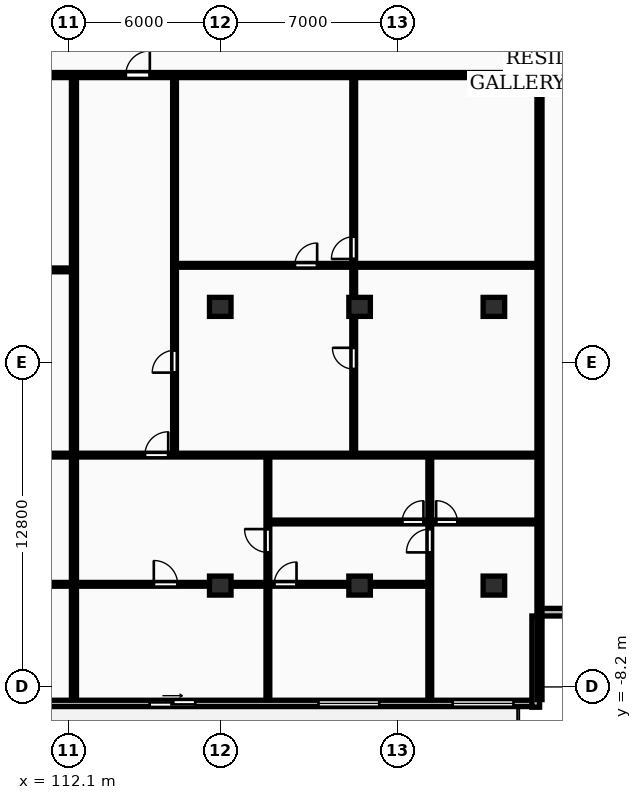
"""IFC4 building model, lengths in metres.
Left out: names, types, materials, properties, quantities, classifications, styles, units other than length and angle.
Written with IfcOpenShell. Run it as: python <this file> out.ifc"""

import sys

from ifc_helpers import new_model, si_unit, direction, frame, frame_2d, origin, origin_2d, place, context, subcontext, project, spatial, rectangle, extrude, element, fill, save


model = new_model("IFC4")
c1 = context("Model", 3, precision=1e-05, world=origin(), true_north=direction((0.0, 1.0)))
c2 = subcontext(c1, "Body", "Model", "MODEL_VIEW")
j1 = project(units=[si_unit("LENGTHUNIT", "METRE"), si_unit("PLANEANGLEUNIT", "RADIAN")], contexts=[c1])
p1 = place(None, origin())
s1 = spatial("IfcSite", under=j1, at=p1, CompositionType="ELEMENT")
p2 = place(p1, origin())
s2 = spatial("IfcBuilding", under=s1, at=p2, CompositionType="ELEMENT")
p3 = place(p2, frame((0.0, 0.0, 100.3)))
s3 = spatial("IfcBuildingStorey", under=s2, at=p3, CompositionType="ELEMENT", Elevation=100.3)
for number, where, z_axis, x_axis in (
    (1, (118.1, -4.2, 0.0), (0.0, 0.0, 1.0), (1.0, 0.0, 0.0)),
    (2, (118.1, 6.8, 0.0), (0.0, 0.0, 1.0), (1.0, 0.0, 0.0)),
    (3, (123.6, -4.2, 0.0), (0.0, 0.0, 1.0), (1.0, 0.0, 0.0)),
    (4, (123.6, 6.8, 0.0), (0.0, 0.0, 1.0), (1.0, 0.0, 0.0)),
    (5, (128.9, -4.2, 0.0), (0.0, 0.0, 1.0), (1.0, 0.0, 0.0)),
    (6, (128.9, 6.8, 0.0), (0.0, 0.0, 1.0), (1.0, 0.0, 0.0)),
):
    element("IfcColumn", number, at=place(p3, frame(where, z_axis=z_axis, x_axis=x_axis)), inside=s3, PredefinedType="COLUMN", context=c2, shape_type="SweptSolid", body=[
        extrude(rectangle(XDim=0.85, YDim=0.75, at=origin_2d()), origin(), (0.0, 0.0, 1.0), 3.25),
    ])
p4 = place(p3, frame((72.7, -8.85, 0.0), z_axis=(0.0, 0.0, 1.0), x_axis=(1.0, 0.0, 0.0)))
e7 = element("IfcWall", 7, at=p4, inside=s3, PredefinedType="STANDARD", context=c2, shape_type="SweptSolid", body=[
    extrude(rectangle(XDim=58.0, YDim=0.25, at=frame_2d((29.0, 0.0))), origin(), (0.0, 0.0, 1.0), 2.97),
])
p5 = place(p4, frame((3.137, 0.0, 0.0)))
e8 = element("IfcOpeningElement", 8, at=p5, cuts=e7, PredefinedType="OPENING", context=c2, shape_type="SweptSolid", body=[
    extrude(rectangle(XDim=1.8, YDim=2.2, at=frame_2d((0.9, 1.1))), frame((0.0, 0.135, 0.0), z_axis=(0.0, -1.0, 0.0), x_axis=(1.0, 0.0, 0.0)), (0.0, 0.0, 1.0), 0.27),
])
p6 = place(p4, frame((12.093, 0.0, 0.85)))
e9 = element("IfcOpeningElement", 9, at=p6, cuts=e7, PredefinedType="OPENING", context=c2, shape_type="SweptSolid", body=[
    extrude(rectangle(XDim=2.4, YDim=1.9, at=frame_2d((1.2, 0.95))), frame((0.0, 0.135, 0.0), z_axis=(0.0, -1.0, 0.0), x_axis=(1.0, 0.0, 0.0)), (0.0, 0.0, 1.0), 0.27),
])
p7 = place(p4, frame((22.913, 0.0, 0.0)))
e10 = element("IfcOpeningElement", 10, at=p7, cuts=e7, PredefinedType="OPENING", context=c2, shape_type="SweptSolid", body=[
    extrude(rectangle(XDim=1.8, YDim=2.2, at=frame_2d((0.9, 1.1))), frame((0.0, 0.135, 0.0), z_axis=(0.0, -1.0, 0.0), x_axis=(1.0, 0.0, 0.0)), (0.0, 0.0, 1.0), 0.27),
])
p8 = place(p4, frame((33.35, 0.0, 0.0)))
e11 = element("IfcOpeningElement", 11, at=p8, cuts=e7, PredefinedType="OPENING", context=c2, shape_type="SweptSolid", body=[
    extrude(rectangle(XDim=1.8, YDim=2.2, at=frame_2d((0.9, 1.1))), frame((0.0, 0.135, 0.0), z_axis=(0.0, -1.0, 0.0), x_axis=(1.0, 0.0, 0.0)), (0.0, 0.0, 1.0), 0.27),
])
p9 = place(p4, frame((49.275, 0.0, 0.85)))
e12 = element("IfcOpeningElement", 12, at=p9, cuts=e7, PredefinedType="OPENING", context=c2, shape_type="SweptSolid", body=[
    extrude(rectangle(XDim=2.4, YDim=1.9, at=frame_2d((1.2, 0.95))), frame((0.0, 0.135, 0.0), z_axis=(0.0, -1.0, 0.0), x_axis=(1.0, 0.0, 0.0)), (0.0, 0.0, 1.0), 0.27),
])
p10 = place(p4, frame((42.613, 0.0, 0.0)))
e13 = element("IfcOpeningElement", 13, at=p10, cuts=e7, PredefinedType="OPENING", context=c2, shape_type="SweptSolid", body=[
    extrude(rectangle(XDim=1.8, YDim=2.2, at=frame_2d((0.9, 1.1))), frame((0.0, 0.135, 0.0), z_axis=(0.0, -1.0, 0.0), x_axis=(1.0, 0.0, 0.0)), (0.0, 0.0, 1.0), 0.27),
])
p11 = place(p4, frame((54.575, 0.0, 0.85)))
e14 = element("IfcOpeningElement", 14, at=p11, cuts=e7, PredefinedType="OPENING", context=c2, shape_type="SweptSolid", body=[
    extrude(rectangle(XDim=2.4, YDim=1.9, at=frame_2d((1.2, 0.95))), frame((0.0, 0.135, 0.0), z_axis=(0.0, -1.0, 0.0), x_axis=(1.0, 0.0, 0.0)), (0.0, 0.0, 1.0), 0.27),
])
for number, where, z_axis, x_axis in (
    (15, (130.55, -9.0, 0.0), (0.0, 0.0, 1.0), (0.0, 1.0, 0.0)),
    (16, (130.7, -5.25, 0.0), (0.0, 0.0, 1.0), (1.0, 0.0, 0.0)),
):
    element("IfcWall", number, at=place(p3, frame(where, z_axis=z_axis, x_axis=x_axis)), inside=s3, PredefinedType="STANDARD", context=c2, shape_type="SweptSolid", body=[
        extrude(rectangle(XDim=3.6, YDim=0.3, at=frame_2d((1.8, 0.0))), origin(), (0.0, 0.0, 1.0), 2.97),
    ])
for number, where, z_axis, x_axis in (
    (17, (130.7, -8.7, 0.0), (0.0, 0.0, 1.0), (0.0, 1.0, 0.0)),
    (18, (112.325, -8.7, 0.0), (0.0, 0.0, 1.0), (0.0, 1.0, 0.0)),
):
    element("IfcWall", number, at=place(p3, frame(where, z_axis=z_axis, x_axis=x_axis)), inside=s3, PredefinedType="PARTITIONING", context=c2, shape_type="SweptSolid", body=[
        extrude(rectangle(XDim=24.57, YDim=0.2, at=frame_2d((12.285, 0.0))), origin(), (0.0, 0.0, 1.0), 2.97),
    ])
p12 = place(p3, frame((105.605, 8.26, 0.0), z_axis=(0.0, 0.0, 1.0), x_axis=(1.0, 0.0, 0.0)))
e19 = element("IfcWall", 19, at=p12, inside=s3, PredefinedType="PARTITIONING", context=c2, shape_type="SweptSolid", body=[
    extrude(rectangle(XDim=6.64, YDim=0.15, at=frame_2d((3.32, 0.0))), origin(), (0.0, 0.0, 1.0), 2.97),
])
p13 = place(p12, frame((0.957, 0.0, 0.0)))
e20 = element("IfcOpeningElement", 20, at=p13, cuts=e19, PredefinedType="OPENING", context=c2, shape_type="SweptSolid", body=[
    extrude(rectangle(XDim=0.88, YDim=2.06, at=frame_2d((0.44, 1.03))), frame((0.0, 0.085, 0.0), z_axis=(0.0, -1.0, 0.0), x_axis=(1.0, 0.0, 0.0)), (0.0, 0.0, 1.0), 0.17),
])
p14 = place(p3, frame((101.655, 0.95, 0.0), z_axis=(0.0, 0.0, 1.0), x_axis=(1.0, 0.0, 0.0)))
e21 = element("IfcWall", 21, at=p14, inside=s3, PredefinedType="PARTITIONING", context=c2, shape_type="SweptSolid", body=[
    extrude(rectangle(XDim=10.59, YDim=0.15, at=frame_2d((5.295, 0.0))), origin(), (0.0, 0.0, 1.0), 2.97),
])
p15 = place(p14, frame((4.835, 0.0, 0.0)))
e22 = element("IfcOpeningElement", 22, at=p15, cuts=e21, PredefinedType="OPENING", context=c2, shape_type="SweptSolid", body=[
    extrude(rectangle(XDim=0.92, YDim=2.08, at=frame_2d((0.46, 1.04))), frame((0.0, 0.085, 0.0), z_axis=(0.0, -1.0, 0.0), x_axis=(1.0, 0.0, 0.0)), (0.0, 0.0, 1.0), 0.17),
])
p16 = place(p3, frame((101.655, -4.15, 0.0), z_axis=(0.0, 0.0, 1.0), x_axis=(1.0, 0.0, 0.0)))
e23 = element("IfcWall", 23, at=p16, inside=s3, PredefinedType="PARTITIONING", context=c2, shape_type="SweptSolid", body=[
    extrude(rectangle(XDim=10.59, YDim=0.15, at=frame_2d((5.295, 0.0))), origin(), (0.0, 0.0, 1.0), 2.663),
])
p17 = place(p16, frame((4.835, 0.0, 0.0)))
e24 = element("IfcOpeningElement", 24, at=p17, cuts=e23, PredefinedType="OPENING", context=c2, shape_type="SweptSolid", body=[
    extrude(rectangle(XDim=0.92, YDim=2.08, at=frame_2d((0.46, 1.04))), frame((0.0, 0.085, 0.0), z_axis=(0.0, -1.0, 0.0), x_axis=(1.0, 0.0, 0.0)), (0.0, 0.0, 1.0), 0.17),
])
p18 = place(p3, frame((123.367, 0.99, 0.0), z_axis=(0.0, 0.0, 1.0), x_axis=(0.0, 1.0, 0.0)))
e25 = element("IfcWall", 25, at=p18, inside=s3, PredefinedType="PARTITIONING", context=c2, shape_type="SweptSolid", body=[
    extrude(rectangle(XDim=14.9, YDim=0.15, at=frame_2d((7.45, 0.0))), origin(), (0.0, 0.0, 1.0), 2.2),
])
p19 = place(p18, frame((3.355, 0.0, 0.0)))
e26 = element("IfcOpeningElement", 26, at=p19, cuts=e25, PredefinedType="OPENING", context=c2, shape_type="SweptSolid", body=[
    extrude(rectangle(XDim=0.84, YDim=2.04, at=frame_2d((0.42, 1.02))), frame((0.0, 0.085, 0.0), z_axis=(0.0, -1.0, 0.0), x_axis=(1.0, 0.0, 0.0)), (0.0, 0.0, 1.0), 0.17),
])
p20 = place(p18, frame((7.7, 0.0, 0.0)))
e27 = element("IfcOpeningElement", 27, at=p20, cuts=e25, PredefinedType="OPENING", context=c2, shape_type="SweptSolid", body=[
    extrude(rectangle(XDim=0.88, YDim=2.06, at=frame_2d((0.44, 1.03))), frame((0.0, 0.085, 0.0), z_axis=(0.0, -1.0, 0.0), x_axis=(1.0, 0.0, 0.0)), (0.0, 0.0, 1.0), 0.17),
])
p21 = place(p3, frame((116.355, 8.44, 0.0), z_axis=(0.0, 0.0, 1.0), x_axis=(1.0, 0.0, 0.0)))
e28 = element("IfcWall", 28, at=p21, inside=s3, PredefinedType="PARTITIONING", context=c2, shape_type="SweptSolid", body=[
    extrude(rectangle(XDim=14.265, YDim=0.15, at=frame_2d((7.133, 0.0))), origin(), (0.0, 0.0, 1.0), 2.97),
])
p22 = place(p21, frame((4.689, 0.0, 0.0)))
e29 = element("IfcOpeningElement", 29, at=p22, cuts=e28, PredefinedType="OPENING", context=c2, shape_type="SweptSolid", body=[
    extrude(rectangle(XDim=0.88, YDim=2.06, at=frame_2d((0.44, 1.03))), frame((0.0, 0.085, 0.0), z_axis=(0.0, -1.0, 0.0), x_axis=(1.0, 0.0, 0.0)), (0.0, 0.0, 1.0), 0.17),
])
p23 = place(p3, frame((116.295, 0.99, 0.0), z_axis=(0.0, 0.0, 1.0), x_axis=(0.0, 1.0, 0.0)))
e30 = element("IfcWall", 30, at=p23, inside=s3, PredefinedType="PARTITIONING", context=c2, shape_type="SweptSolid", body=[
    extrude(rectangle(XDim=14.9, YDim=0.15, at=frame_2d((7.45, 0.0))), origin(), (0.0, 0.0, 1.0), 2.97),
])
p24 = place(p23, frame((3.216, 0.0, 0.0)))
e31 = element("IfcOpeningElement", 31, at=p24, cuts=e30, PredefinedType="OPENING", context=c2, shape_type="SweptSolid", body=[
    extrude(rectangle(XDim=0.88, YDim=2.06, at=frame_2d((0.44, 1.03))), frame((0.0, 0.085, 0.0), z_axis=(0.0, -1.0, 0.0), x_axis=(1.0, 0.0, 0.0)), (0.0, 0.0, 1.0), 0.17),
])
p25 = place(p3, frame((119.98, -8.7, 0.0), z_axis=(0.0, 0.0, 1.0), x_axis=(0.0, 1.0, 0.0)))
e32 = element("IfcWall", 32, at=p25, inside=s3, PredefinedType="PARTITIONING", context=c2, shape_type="SweptSolid", body=[
    extrude(rectangle(XDim=9.61, YDim=0.15, at=frame_2d((4.805, 0.0))), origin(), (0.0, 0.0, 1.0), 2.97),
])
p26 = place(p25, frame((5.81, 0.0, 0.0)))
e33 = element("IfcOpeningElement", 33, at=p26, cuts=e32, PredefinedType="OPENING", context=c2, shape_type="SweptSolid", body=[
    extrude(rectangle(XDim=0.92, YDim=2.08, at=frame_2d((0.46, 1.04))), frame((0.0, 0.085, 0.0), z_axis=(0.0, -1.0, 0.0), x_axis=(1.0, 0.0, 0.0)), (0.0, 0.0, 1.0), 0.17),
])
p27 = place(p3, frame((126.37, -1.67, 0.0), z_axis=(0.0, 0.0, 1.0), x_axis=(0.0, 1.0, 0.0)))
e34 = element("IfcWall", 34, at=p27, inside=s3, PredefinedType="PARTITIONING", context=c2, shape_type="SweptSolid", body=[
    extrude(rectangle(XDim=2.58, YDim=0.15, at=frame_2d((1.29, 0.0))), origin(), (0.0, 0.0, 1.0), 2.97),
])
p28 = place(p3, frame((126.37, -8.7, 0.0), z_axis=(0.0, 0.0, 1.0), x_axis=(0.0, 1.0, 0.0)))
e35 = element("IfcWall", 35, at=p28, inside=s3, PredefinedType="PARTITIONING", context=c2, shape_type="SweptSolid", body=[
    extrude(rectangle(XDim=6.99, YDim=0.15, at=frame_2d((3.495, 0.0))), origin(), (0.0, 0.0, 1.0), 2.97),
])
p29 = place(p28, frame((5.81, 0.0, 0.0)))
e36 = element("IfcOpeningElement", 36, at=p29, cuts=e35, PredefinedType="OPENING", context=c2, shape_type="SweptSolid", body=[
    extrude(rectangle(XDim=0.92, YDim=2.08, at=frame_2d((0.46, 1.04))), frame((0.0, 0.085, 0.0), z_axis=(0.0, -1.0, 0.0), x_axis=(1.0, 0.0, 0.0)), (0.0, 0.0, 1.0), 0.17),
])
p30 = place(p3, frame((120.02, -1.69, 0.0), z_axis=(0.0, 0.0, 1.0), x_axis=(1.0, 0.0, 0.0)))
e37 = element("IfcWall", 37, at=p30, inside=s3, PredefinedType="PARTITIONING", context=c2, shape_type="SweptSolid", body=[
    extrude(rectangle(XDim=10.6, YDim=0.15, at=frame_2d((5.3, 0.0))), origin(), (0.0, 0.0, 1.0), 2.97),
])
p31 = place(p30, frame((5.26, 0.0, 0.0)))
e38 = element("IfcOpeningElement", 38, at=p31, cuts=e37, PredefinedType="OPENING", context=c2, shape_type="SweptSolid", body=[
    extrude(rectangle(XDim=0.84, YDim=2.04, at=frame_2d((0.42, 1.02))), frame((0.0, 0.085, 0.0), z_axis=(0.0, -1.0, 0.0), x_axis=(1.0, 0.0, 0.0)), (0.0, 0.0, 1.0), 0.17),
])
p32 = place(p30, frame((6.6, 0.0, 0.0)))
e39 = element("IfcOpeningElement", 39, at=p32, cuts=e37, PredefinedType="OPENING", context=c2, shape_type="SweptSolid", body=[
    extrude(rectangle(XDim=0.84, YDim=2.04, at=frame_2d((0.42, 1.02))), frame((0.0, 0.085, 0.0), z_axis=(0.0, -1.0, 0.0), x_axis=(1.0, 0.0, 0.0)), (0.0, 0.0, 1.0), 0.17),
])
p33 = place(p3, frame((112.405, 0.95, 0.0), z_axis=(0.0, 0.0, 1.0), x_axis=(1.0, 0.0, 0.0)))
e40 = element("IfcWall", 40, at=p33, inside=s3, PredefinedType="PARTITIONING", context=c2, shape_type="SweptSolid", body=[
    extrude(rectangle(XDim=18.215, YDim=0.15, at=frame_2d((9.107, 0.0))), origin(), (0.0, 0.0, 1.0), 2.97),
])
p34 = place(p33, frame((2.72, 0.0, 0.0)))
e41 = element("IfcOpeningElement", 41, at=p34, cuts=e40, PredefinedType="OPENING", context=c2, shape_type="SweptSolid", body=[
    extrude(rectangle(XDim=0.92, YDim=2.08, at=frame_2d((0.46, 1.04))), frame((0.0, 0.085, 0.0), z_axis=(0.0, -1.0, 0.0), x_axis=(1.0, 0.0, 0.0)), (0.0, 0.0, 1.0), 0.17),
])
p35 = place(p3, frame((112.405, -4.15, 0.0), z_axis=(0.0, 0.0, 1.0), x_axis=(1.0, 0.0, 0.0)))
e42 = element("IfcWall", 42, at=p35, inside=s3, PredefinedType="PARTITIONING", context=c2, shape_type="SweptSolid", body=[
    extrude(rectangle(XDim=13.965, YDim=0.15, at=frame_2d((6.982, 0.0))), origin(), (0.0, 0.0, 1.0), 2.663),
])
p36 = place(p35, frame((3.072, 0.0, 0.0)))
e43 = element("IfcOpeningElement", 43, at=p36, cuts=e42, PredefinedType="OPENING", context=c2, shape_type="SweptSolid", body=[
    extrude(rectangle(XDim=0.94, YDim=2.1, at=frame_2d((0.47, 1.05))), frame((0.0, 0.085, 0.0), z_axis=(0.0, -1.0, 0.0), x_axis=(1.0, 0.0, 0.0)), (0.0, 0.0, 1.0), 0.17),
])
p37 = place(p35, frame((7.825, 0.0, 0.0)))
e44 = element("IfcOpeningElement", 44, at=p37, cuts=e42, PredefinedType="OPENING", context=c2, shape_type="SweptSolid", body=[
    extrude(rectangle(XDim=0.88, YDim=2.06, at=frame_2d((0.44, 1.03))), frame((0.0, 0.085, 0.0), z_axis=(0.0, -1.0, 0.0), x_axis=(1.0, 0.0, 0.0)), (0.0, 0.0, 1.0), 0.17),
])
p38 = place(p3, frame((72.7, 15.95, 0.0), z_axis=(0.0, 0.0, 1.0), x_axis=(1.0, 0.0, 0.0)))
e45 = element("IfcWall", 45, at=p38, inside=s3, PredefinedType="PARTITIONING", context=c2, shape_type="SweptSolid", body=[
    extrude(rectangle(XDim=58.0, YDim=0.2, at=frame_2d((29.0, 0.0))), origin(), (0.0, 0.0, 1.0), 2.97),
])
p39 = place(p38, frame((6.539, 0.0, 0.0)))
e46 = element("IfcOpeningElement", 46, at=p39, cuts=e45, PredefinedType="OPENING", context=c2, shape_type="SweptSolid", body=[
    extrude(rectangle(XDim=1.22, YDim=2.18, at=frame_2d((0.61, 1.09))), frame((0.0, 0.11, 0.0), z_axis=(0.0, -1.0, 0.0), x_axis=(1.0, 0.0, 0.0)), (0.0, 0.0, 1.0), 0.22),
])
p40 = place(p38, frame((20.795, 0.0, 0.0)))
e47 = element("IfcOpeningElement", 47, at=p40, cuts=e45, PredefinedType="OPENING", context=c2, shape_type="SweptSolid", body=[
    extrude(rectangle(XDim=0.95, YDim=2.15, at=frame_2d((0.475, 1.075))), frame((0.0, 0.11, 0.0), z_axis=(0.0, -1.0, 0.0), x_axis=(1.0, 0.0, 0.0)), (0.0, 0.0, 1.0), 0.22),
])
p41 = place(p38, frame((30.92, 0.0, 0.0)))
e48 = element("IfcOpeningElement", 48, at=p41, cuts=e45, PredefinedType="OPENING", context=c2, shape_type="SweptSolid", body=[
    extrude(rectangle(XDim=0.95, YDim=2.15, at=frame_2d((0.475, 1.075))), frame((0.0, 0.11, 0.0), z_axis=(0.0, -1.0, 0.0), x_axis=(1.0, 0.0, 0.0)), (0.0, 0.0, 1.0), 0.22),
])
p42 = place(p38, frame((41.67, 0.0, 0.0)))
e49 = element("IfcOpeningElement", 49, at=p42, cuts=e45, PredefinedType="OPENING", context=c2, shape_type="SweptSolid", body=[
    extrude(rectangle(XDim=0.95, YDim=2.15, at=frame_2d((0.475, 1.075))), frame((0.0, 0.11, 0.0), z_axis=(0.0, -1.0, 0.0), x_axis=(1.0, 0.0, 0.0)), (0.0, 0.0, 1.0), 0.22),
])
p43 = place(p9, origin())
e50 = element("IfcWindow", 50, at=p43, inside=s3, PartitioningType="DOUBLE_PANEL_VERTICAL", PredefinedType="WINDOW", context=c2, shape_type="SweptSolid", body=[
    extrude(rectangle(XDim=2.4, YDim=1.9, at=frame_2d((1.2, 0.95))), frame((0.0, 0.03, 0.0), z_axis=(0.0, -1.0, 0.0), x_axis=(1.0, 0.0, 0.0)), (0.0, 0.0, 1.0), 0.06),
])
fill(e12, e50)
p44 = place(p10, origin())
e51 = element("IfcDoor", 51, at=p44, inside=s3, OperationType="SLIDING_TO_RIGHT", PredefinedType="DOOR", context=c2, shape_type="SweptSolid", body=[
    extrude(rectangle(XDim=1.8, YDim=2.2, at=frame_2d((0.9, 1.1))), frame((0.0, 0.025, 0.0), z_axis=(0.0, -1.0, 0.0), x_axis=(1.0, 0.0, 0.0)), (0.0, 0.0, 1.0), 0.05),
])
fill(e13, e51)
p45 = place(p11, origin())
e52 = element("IfcWindow", 52, at=p45, inside=s3, PartitioningType="DOUBLE_PANEL_VERTICAL", PredefinedType="WINDOW", context=c2, shape_type="SweptSolid", body=[
    extrude(rectangle(XDim=2.4, YDim=1.9, at=frame_2d((1.2, 0.95))), frame((0.0, 0.03, 0.0), z_axis=(0.0, -1.0, 0.0), x_axis=(1.0, 0.0, 0.0)), (0.0, 0.0, 1.0), 0.06),
])
fill(e14, e52)
p46 = place(p19, origin())
e53 = element("IfcDoor", 53, at=p46, inside=s3, OperationType="SINGLE_SWING_RIGHT", PredefinedType="DOOR", context=c2, shape_type="SweptSolid", body=[
    extrude(rectangle(XDim=0.84, YDim=2.04, at=frame_2d((0.42, 1.02))), frame((0.0, 0.025, 0.0), z_axis=(0.0, -1.0, 0.0), x_axis=(1.0, 0.0, 0.0)), (0.0, 0.0, 1.0), 0.05),
])
fill(e26, e53)
p47 = place(p20, origin())
e54 = element("IfcDoor", 54, at=p47, inside=s3, OperationType="SINGLE_SWING_LEFT", PredefinedType="DOOR", context=c2, shape_type="SweptSolid", body=[
    extrude(rectangle(XDim=0.88, YDim=2.06, at=frame_2d((0.44, 1.03))), frame((0.0, 0.025, 0.0), z_axis=(0.0, -1.0, 0.0), x_axis=(1.0, 0.0, 0.0)), (0.0, 0.0, 1.0), 0.05),
])
fill(e27, e54)
p48 = place(p22, origin())
e55 = element("IfcDoor", 55, at=p48, inside=s3, OperationType="SINGLE_SWING_RIGHT", PredefinedType="DOOR", context=c2, shape_type="SweptSolid", body=[
    extrude(rectangle(XDim=0.88, YDim=2.06, at=frame_2d((0.44, 1.03))), frame((0.0, 0.025, 0.0), z_axis=(0.0, -1.0, 0.0), x_axis=(1.0, 0.0, 0.0)), (0.0, 0.0, 1.0), 0.05),
])
fill(e29, e55)
p49 = place(p24, origin())
e56 = element("IfcDoor", 56, at=p49, inside=s3, OperationType="SINGLE_SWING_LEFT", PredefinedType="DOOR", context=c2, shape_type="SweptSolid", body=[
    extrude(rectangle(XDim=0.88, YDim=2.06, at=frame_2d((0.44, 1.03))), frame((0.0, 0.025, 0.0), z_axis=(0.0, -1.0, 0.0), x_axis=(1.0, 0.0, 0.0)), (0.0, 0.0, 1.0), 0.05),
])
fill(e31, e56)
p50 = place(p26, origin())
e57 = element("IfcDoor", 57, at=p50, inside=s3, OperationType="SINGLE_SWING_RIGHT", PredefinedType="DOOR", context=c2, shape_type="SweptSolid", body=[
    extrude(rectangle(XDim=0.92, YDim=2.08, at=frame_2d((0.46, 1.04))), frame((0.0, 0.025, 0.0), z_axis=(0.0, -1.0, 0.0), x_axis=(1.0, 0.0, 0.0)), (0.0, 0.0, 1.0), 0.05),
])
fill(e33, e57)
p51 = place(p29, origin())
e58 = element("IfcDoor", 58, at=p51, inside=s3, OperationType="SINGLE_SWING_LEFT", PredefinedType="DOOR", context=c2, shape_type="SweptSolid", body=[
    extrude(rectangle(XDim=0.92, YDim=2.08, at=frame_2d((0.46, 1.04))), frame((0.0, 0.025, 0.0), z_axis=(0.0, -1.0, 0.0), x_axis=(1.0, 0.0, 0.0)), (0.0, 0.0, 1.0), 0.05),
])
fill(e36, e58)
p52 = place(p31, origin())
e59 = element("IfcDoor", 59, at=p52, inside=s3, OperationType="SINGLE_SWING_RIGHT", PredefinedType="DOOR", context=c2, shape_type="SweptSolid", body=[
    extrude(rectangle(XDim=0.84, YDim=2.04, at=frame_2d((0.42, 1.02))), frame((0.0, 0.025, 0.0), z_axis=(0.0, -1.0, 0.0), x_axis=(1.0, 0.0, 0.0)), (0.0, 0.0, 1.0), 0.05),
])
fill(e38, e59)
p53 = place(p32, origin())
e60 = element("IfcDoor", 60, at=p53, inside=s3, OperationType="SINGLE_SWING_LEFT", PredefinedType="DOOR", context=c2, shape_type="SweptSolid", body=[
    extrude(rectangle(XDim=0.84, YDim=2.04, at=frame_2d((0.42, 1.02))), frame((0.0, 0.025, 0.0), z_axis=(0.0, -1.0, 0.0), x_axis=(1.0, 0.0, 0.0)), (0.0, 0.0, 1.0), 0.05),
])
fill(e39, e60)
p54 = place(p34, origin())
e61 = element("IfcDoor", 61, at=p54, inside=s3, OperationType="SINGLE_SWING_RIGHT", PredefinedType="DOOR", context=c2, shape_type="SweptSolid", body=[
    extrude(rectangle(XDim=0.92, YDim=2.08, at=frame_2d((0.46, 1.04))), frame((0.0, 0.025, 0.0), z_axis=(0.0, -1.0, 0.0), x_axis=(1.0, 0.0, 0.0)), (0.0, 0.0, 1.0), 0.05),
])
fill(e41, e61)
p55 = place(p36, origin())
e62 = element("IfcDoor", 62, at=p55, inside=s3, OperationType="SINGLE_SWING_LEFT", PredefinedType="DOOR", context=c2, shape_type="SweptSolid", body=[
    extrude(rectangle(XDim=0.94, YDim=2.1, at=frame_2d((0.47, 1.05))), frame((0.0, 0.025, 0.0), z_axis=(0.0, -1.0, 0.0), x_axis=(1.0, 0.0, 0.0)), (0.0, 0.0, 1.0), 0.05),
])
fill(e43, e62)
p56 = place(p37, origin())
e63 = element("IfcDoor", 63, at=p56, inside=s3, OperationType="SINGLE_SWING_RIGHT", PredefinedType="DOOR", context=c2, shape_type="SweptSolid", body=[
    extrude(rectangle(XDim=0.88, YDim=2.06, at=frame_2d((0.44, 1.03))), frame((0.0, 0.025, 0.0), z_axis=(0.0, -1.0, 0.0), x_axis=(1.0, 0.0, 0.0)), (0.0, 0.0, 1.0), 0.05),
])
fill(e44, e63)
p57 = place(p42, origin())
e64 = element("IfcDoor", 64, at=p57, inside=s3, OperationType="SINGLE_SWING_RIGHT", PredefinedType="DOOR", context=c2, shape_type="SweptSolid", body=[
    extrude(rectangle(XDim=0.95, YDim=2.15, at=frame_2d((0.475, 1.075))), frame((0.0, 0.025, 0.0), z_axis=(0.0, -1.0, 0.0), x_axis=(1.0, 0.0, 0.0)), (0.0, 0.0, 1.0), 0.05),
])
fill(e49, e64)
save(model, sys.argv[1])
